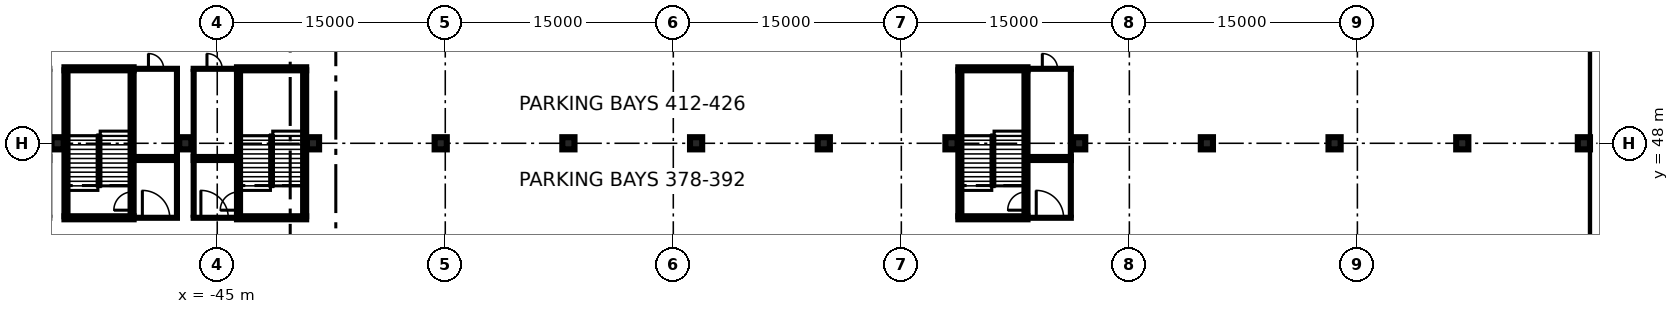
"""IFC4 building model, lengths in metres.
Left out: names, types, materials, properties, quantities, classifications, styles, units other than length and angle.
Written with IfcOpenShell. Run it as: python <this file> out.ifc"""

import sys

from ifc_helpers import new_model, si_unit, direction, frame, frame_2d, origin, origin_2d, place, context, subcontext, project, spatial, rectangle, extrude, element, fill, save


model = new_model("IFC4")
c1 = context("Model", 3, precision=1e-05, world=origin(), true_north=direction((0.0, 1.0)))
c2 = subcontext(c1, "Body", "Model", "MODEL_VIEW")
j1 = project(units=[si_unit("LENGTHUNIT", "METRE"), si_unit("PLANEANGLEUNIT", "RADIAN")], contexts=[c1])
p1 = place(None, origin())
s1 = spatial("IfcSite", under=j1, at=p1, CompositionType="ELEMENT")
p2 = place(p1, origin())
s2 = spatial("IfcBuilding", under=s1, at=p2, CompositionType="ELEMENT")
p3 = place(p2, frame((0.0, 0.0, -12.0)))
s3 = spatial("IfcBuildingStorey", under=s2, at=p3, CompositionType="ELEMENT", Elevation=-12.0)
p4 = place(p3, frame((45.75, -80.0, 0.0), z_axis=(0.0, 0.0, 1.0), x_axis=(0.0, 1.0, 0.0)))
e1 = element("IfcWall", 1, at=p4, inside=s3, PredefinedType="USERDEFINED", context=c2, shape_type="SweptSolid", body=[
    extrude(rectangle(XDim=160.0, YDim=0.9, at=frame_2d((80.0, 0.0))), origin(), (0.0, 0.0, 1.0), 11.55),
])
p5 = place(p2, frame((0.0, 0.0, -3.6)))
s4 = spatial("IfcBuildingStorey", under=s2, at=p5, CompositionType="ELEMENT", Elevation=-3.6)
for number, where, z_axis, x_axis in (
    (2, (-55.5, 48.0, -0.4), (0.0, 0.0, 1.0), (1.0, 0.0, 0.0)),
    (3, (-47.1, 48.0, -0.4), (0.0, 0.0, 1.0), (1.0, 0.0, 0.0)),
    (4, (-38.7, 48.0, -0.4), (0.0, 0.0, 1.0), (1.0, 0.0, 0.0)),
    (5, (-30.3, 48.0, -0.4), (0.0, 0.0, 1.0), (1.0, 0.0, 0.0)),
    (6, (-21.9, 48.0, -0.4), (0.0, 0.0, 1.0), (1.0, 0.0, 0.0)),
    (7, (-13.5, 48.0, -0.4), (0.0, 0.0, 1.0), (1.0, 0.0, 0.0)),
    (8, (-5.1, 48.0, -0.4), (0.0, 0.0, 1.0), (1.0, 0.0, 0.0)),
    (9, (3.3, 48.0, -0.4), (0.0, 0.0, 1.0), (1.0, 0.0, 0.0)),
    (10, (11.7, 48.0, -0.4), (0.0, 0.0, 1.0), (1.0, 0.0, 0.0)),
    (11, (20.1, 48.0, -0.4), (0.0, 0.0, 1.0), (1.0, 0.0, 0.0)),
    (12, (28.5, 48.0, -0.4), (0.0, 0.0, 1.0), (1.0, 0.0, 0.0)),
    (13, (36.9, 48.0, -0.4), (0.0, 0.0, 1.0), (1.0, 0.0, 0.0)),
    (14, (44.9, 48.0, -0.4), (0.0, 0.0, 1.0), (1.0, 0.0, 0.0)),
):
    element("IfcColumn", number, at=place(p5, frame(where, z_axis=z_axis, x_axis=x_axis)), inside=s4, PredefinedType="COLUMN", context=c2, shape_type="SweptSolid", body=[
        extrude(rectangle(XDim=0.8, YDim=0.8, at=origin_2d()), origin(), (0.0, 0.0, 1.0), 3.55),
    ])
p6 = place(p5, frame((-50.5, 43.1, 0.0), z_axis=(0.0, 0.0, 1.0), x_axis=(1.0, 0.0, 0.0)))
e15 = element("IfcWall", 15, at=p6, inside=s4, PredefinedType="PARTITIONING", context=c2, shape_type="SweptSolid", body=[
    extrude(rectangle(XDim=2.95, YDim=0.2, at=frame_2d((1.475, 0.0))), origin(), (0.0, 0.0, 1.0), 3.15),
])
p7 = place(p6, frame((0.575, 0.0, 0.0)))
e16 = element("IfcOpeningElement", 16, at=p7, cuts=e15, PredefinedType="OPENING", context=c2, shape_type="SweptSolid", body=[
    extrude(rectangle(XDim=1.8, YDim=2.1, at=frame_2d((0.9, 1.05))), frame((0.0, 0.11, 0.0), z_axis=(0.0, -1.0, 0.0), x_axis=(1.0, 0.0, 0.0)), (0.0, 0.0, 1.0), 0.22),
])
p8 = place(p5, frame((-50.5, 46.9, 0.0), z_axis=(0.0, 0.0, 1.0), x_axis=(1.0, 0.0, 0.0)))
e17 = element("IfcWall", 17, at=p8, inside=s4, PredefinedType="PARTITIONING", context=c2, shape_type="SweptSolid", body=[
    extrude(rectangle(XDim=2.95, YDim=0.2, at=frame_2d((1.475, 0.0))), origin(), (0.0, 0.0, 1.0), 3.15),
])
p9 = place(p5, frame((-47.65, 43.2, 0.0), z_axis=(0.0, 0.0, 1.0), x_axis=(0.0, 1.0, 0.0)))
e18 = element("IfcWall", 18, at=p9, inside=s4, PredefinedType="PARTITIONING", context=c2, shape_type="SweptSolid", body=[
    extrude(rectangle(XDim=3.6, YDim=0.2, at=frame_2d((1.8, 0.0))), origin(), (0.0, 0.0, 1.0), 3.15),
])
p10 = place(p5, frame((-50.5, 47.1, 0.0), z_axis=(0.0, 0.0, 1.0), x_axis=(1.0, 0.0, 0.0)))
e19 = element("IfcWall", 19, at=p10, inside=s4, PredefinedType="PARTITIONING", context=c2, shape_type="SweptSolid", body=[
    extrude(rectangle(XDim=2.95, YDim=0.2, at=frame_2d((1.475, 0.0))), origin(), (0.0, 0.0, 1.0), 3.15),
])
p11 = place(p5, frame((-50.5, 52.9, 0.0), z_axis=(0.0, 0.0, 1.0), x_axis=(1.0, 0.0, 0.0)))
e20 = element("IfcWall", 20, at=p11, inside=s4, PredefinedType="PARTITIONING", context=c2, shape_type="SweptSolid", body=[
    extrude(rectangle(XDim=2.95, YDim=0.2, at=frame_2d((1.475, 0.0))), origin(), (0.0, 0.0, 1.0), 3.15),
])
p12 = place(p11, frame((0.975, 0.0, 0.0)))
e21 = element("IfcOpeningElement", 21, at=p12, cuts=e20, PredefinedType="OPENING", context=c2, shape_type="SweptSolid", body=[
    extrude(rectangle(XDim=1.0, YDim=2.1, at=frame_2d((0.5, 1.05))), frame((0.0, 0.11, 0.0), z_axis=(0.0, -1.0, 0.0), x_axis=(1.0, 0.0, 0.0)), (0.0, 0.0, 1.0), 0.22),
])
p13 = place(p5, frame((-47.65, 47.2, 0.0), z_axis=(0.0, 0.0, 1.0), x_axis=(0.0, 1.0, 0.0)))
e22 = element("IfcWall", 22, at=p13, inside=s4, PredefinedType="PARTITIONING", context=c2, shape_type="SweptSolid", body=[
    extrude(rectangle(XDim=5.6, YDim=0.2, at=frame_2d((2.8, 0.0))), origin(), (0.0, 0.0, 1.0), 3.15),
])
p14 = place(p5, frame((8.3, 43.1, 0.0), z_axis=(0.0, 0.0, 1.0), x_axis=(1.0, 0.0, 0.0)))
e23 = element("IfcWall", 23, at=p14, inside=s4, PredefinedType="PARTITIONING", context=c2, shape_type="SweptSolid", body=[
    extrude(rectangle(XDim=2.95, YDim=0.2, at=frame_2d((1.475, 0.0))), origin(), (0.0, 0.0, 1.0), 3.15),
])
p15 = place(p14, frame((0.575, 0.0, 0.0)))
e24 = element("IfcOpeningElement", 24, at=p15, cuts=e23, PredefinedType="OPENING", context=c2, shape_type="SweptSolid", body=[
    extrude(rectangle(XDim=1.8, YDim=2.1, at=frame_2d((0.9, 1.05))), frame((0.0, 0.11, 0.0), z_axis=(0.0, -1.0, 0.0), x_axis=(1.0, 0.0, 0.0)), (0.0, 0.0, 1.0), 0.22),
])
p16 = place(p5, frame((8.3, 46.9, 0.0), z_axis=(0.0, 0.0, 1.0), x_axis=(1.0, 0.0, 0.0)))
e25 = element("IfcWall", 25, at=p16, inside=s4, PredefinedType="PARTITIONING", context=c2, shape_type="SweptSolid", body=[
    extrude(rectangle(XDim=2.95, YDim=0.2, at=frame_2d((1.475, 0.0))), origin(), (0.0, 0.0, 1.0), 3.15),
])
p17 = place(p5, frame((11.15, 43.2, 0.0), z_axis=(0.0, 0.0, 1.0), x_axis=(0.0, 1.0, 0.0)))
e26 = element("IfcWall", 26, at=p17, inside=s4, PredefinedType="PARTITIONING", context=c2, shape_type="SweptSolid", body=[
    extrude(rectangle(XDim=3.6, YDim=0.2, at=frame_2d((1.8, 0.0))), origin(), (0.0, 0.0, 1.0), 3.15),
])
p18 = place(p5, frame((8.3, 47.1, 0.0), z_axis=(0.0, 0.0, 1.0), x_axis=(1.0, 0.0, 0.0)))
e27 = element("IfcWall", 27, at=p18, inside=s4, PredefinedType="PARTITIONING", context=c2, shape_type="SweptSolid", body=[
    extrude(rectangle(XDim=2.95, YDim=0.2, at=frame_2d((1.475, 0.0))), origin(), (0.0, 0.0, 1.0), 3.15),
])
p19 = place(p5, frame((8.3, 52.9, 0.0), z_axis=(0.0, 0.0, 1.0), x_axis=(1.0, 0.0, 0.0)))
e28 = element("IfcWall", 28, at=p19, inside=s4, PredefinedType="PARTITIONING", context=c2, shape_type="SweptSolid", body=[
    extrude(rectangle(XDim=2.95, YDim=0.2, at=frame_2d((1.475, 0.0))), origin(), (0.0, 0.0, 1.0), 3.15),
])
p20 = place(p19, frame((0.975, 0.0, 0.0)))
e29 = element("IfcOpeningElement", 29, at=p20, cuts=e28, PredefinedType="OPENING", context=c2, shape_type="SweptSolid", body=[
    extrude(rectangle(XDim=1.0, YDim=2.1, at=frame_2d((0.5, 1.05))), frame((0.0, 0.11, 0.0), z_axis=(0.0, -1.0, 0.0), x_axis=(1.0, 0.0, 0.0)), (0.0, 0.0, 1.0), 0.22),
])
p21 = place(p5, frame((11.15, 47.2, 0.0), z_axis=(0.0, 0.0, 1.0), x_axis=(0.0, 1.0, 0.0)))
e30 = element("IfcWall", 30, at=p21, inside=s4, PredefinedType="PARTITIONING", context=c2, shape_type="SweptSolid", body=[
    extrude(rectangle(XDim=5.6, YDim=0.2, at=frame_2d((2.8, 0.0))), origin(), (0.0, 0.0, 1.0), 3.15),
])
p22 = place(p5, frame((-46.65, 43.1, 0.0), z_axis=(0.0, 0.0, 1.0), x_axis=(1.0, 0.0, 0.0)))
e31 = element("IfcWall", 31, at=p22, inside=s4, PredefinedType="PARTITIONING", context=c2, shape_type="SweptSolid", body=[
    extrude(rectangle(XDim=2.95, YDim=0.2, at=frame_2d((1.475, 0.0))), origin(), (0.0, 0.0, 1.0), 3.15),
])
p23 = place(p22, frame((0.575, 0.0, 0.0)))
e32 = element("IfcOpeningElement", 32, at=p23, cuts=e31, PredefinedType="OPENING", context=c2, shape_type="SweptSolid", body=[
    extrude(rectangle(XDim=1.8, YDim=2.1, at=frame_2d((0.9, 1.05))), frame((0.0, 0.11, 0.0), z_axis=(0.0, -1.0, 0.0), x_axis=(1.0, 0.0, 0.0)), (0.0, 0.0, 1.0), 0.22),
])
p24 = place(p5, frame((-46.65, 46.9, 0.0), z_axis=(0.0, 0.0, 1.0), x_axis=(1.0, 0.0, 0.0)))
e33 = element("IfcWall", 33, at=p24, inside=s4, PredefinedType="PARTITIONING", context=c2, shape_type="SweptSolid", body=[
    extrude(rectangle(XDim=2.95, YDim=0.2, at=frame_2d((1.475, 0.0))), origin(), (0.0, 0.0, 1.0), 3.15),
])
p25 = place(p5, frame((-46.55, 43.2, 0.0), z_axis=(0.0, 0.0, 1.0), x_axis=(0.0, 1.0, 0.0)))
e34 = element("IfcWall", 34, at=p25, inside=s4, PredefinedType="PARTITIONING", context=c2, shape_type="SweptSolid", body=[
    extrude(rectangle(XDim=3.6, YDim=0.2, at=frame_2d((1.8, 0.0))), origin(), (0.0, 0.0, 1.0), 3.15),
])
p26 = place(p5, frame((-46.65, 47.1, 0.0), z_axis=(0.0, 0.0, 1.0), x_axis=(1.0, 0.0, 0.0)))
e35 = element("IfcWall", 35, at=p26, inside=s4, PredefinedType="PARTITIONING", context=c2, shape_type="SweptSolid", body=[
    extrude(rectangle(XDim=2.95, YDim=0.2, at=frame_2d((1.475, 0.0))), origin(), (0.0, 0.0, 1.0), 3.15),
])
p27 = place(p5, frame((-46.65, 52.9, 0.0), z_axis=(0.0, 0.0, 1.0), x_axis=(1.0, 0.0, 0.0)))
e36 = element("IfcWall", 36, at=p27, inside=s4, PredefinedType="PARTITIONING", context=c2, shape_type="SweptSolid", body=[
    extrude(rectangle(XDim=2.95, YDim=0.2, at=frame_2d((1.475, 0.0))), origin(), (0.0, 0.0, 1.0), 3.15),
])
p28 = place(p27, frame((0.975, 0.0, 0.0)))
e37 = element("IfcOpeningElement", 37, at=p28, cuts=e36, PredefinedType="OPENING", context=c2, shape_type="SweptSolid", body=[
    extrude(rectangle(XDim=1.0, YDim=2.1, at=frame_2d((0.5, 1.05))), frame((0.0, 0.11, 0.0), z_axis=(0.0, -1.0, 0.0), x_axis=(1.0, 0.0, 0.0)), (0.0, 0.0, 1.0), 0.22),
])
p29 = place(p5, frame((-46.55, 47.2, 0.0), z_axis=(0.0, 0.0, 1.0), x_axis=(0.0, 1.0, 0.0)))
e38 = element("IfcWall", 38, at=p29, inside=s4, PredefinedType="PARTITIONING", context=c2, shape_type="SweptSolid", body=[
    extrude(rectangle(XDim=5.6, YDim=0.2, at=frame_2d((2.8, 0.0))), origin(), (0.0, 0.0, 1.0), 3.15),
])
p30 = place(p5, frame((-54.95, 43.2, 0.0), z_axis=(0.0, 0.0, 1.0), x_axis=(0.0, 1.0, 0.0)))
e39 = element("IfcWall", 39, at=p30, inside=s4, PredefinedType="SOLIDWALL", context=c2, shape_type="SweptSolid", body=[
    extrude(rectangle(XDim=9.6, YDim=0.2, at=frame_2d((4.8, 0.0))), origin(), (0.0, 0.0, 1.0), 3.15),
])
p31 = place(p5, frame((-50.6, 43.2, 0.0), z_axis=(0.0, 0.0, 1.0), x_axis=(0.0, 1.0, 0.0)))
e40 = element("IfcWall", 40, at=p31, inside=s4, PredefinedType="SOLIDWALL", context=c2, shape_type="SweptSolid", body=[
    extrude(rectangle(XDim=9.6, YDim=0.2, at=frame_2d((4.8, 0.0))), origin(), (0.0, 0.0, 1.0), 3.15),
])
p32 = place(p31, frame((0.4, 0.0, 0.0)))
e41 = element("IfcOpeningElement", 41, at=p32, cuts=e40, PredefinedType="OPENING", context=c2, shape_type="SweptSolid", body=[
    extrude(rectangle(XDim=1.2, YDim=2.1, at=frame_2d((0.6, 1.05))), frame((0.0, 0.11, 0.0), z_axis=(0.0, -1.0, 0.0), x_axis=(1.0, 0.0, 0.0)), (0.0, 0.0, 1.0), 0.22),
])
for number, where, z_axis, x_axis in (
    (42, (-50.5, 43.1, 0.0), (0.0, 0.0, 1.0), (-1.0, 0.0, 0.0)),
    (43, (-55.05, 52.9, 0.0), (0.0, 0.0, 1.0), (1.0, 0.0, 0.0)),
):
    element("IfcWall", number, at=place(p5, frame(where, z_axis=z_axis, x_axis=x_axis)), inside=s4, PredefinedType="SOLIDWALL", context=c2, shape_type="SweptSolid", body=[
        extrude(rectangle(XDim=4.55, YDim=0.2, at=frame_2d((2.275, 0.0))), origin(), (0.0, 0.0, 1.0), 3.15),
    ])
p33 = place(p5, frame((3.85, 43.2, 0.0), z_axis=(0.0, 0.0, 1.0), x_axis=(0.0, 1.0, 0.0)))
e44 = element("IfcWall", 44, at=p33, inside=s4, PredefinedType="SOLIDWALL", context=c2, shape_type="SweptSolid", body=[
    extrude(rectangle(XDim=9.6, YDim=0.2, at=frame_2d((4.8, 0.0))), origin(), (0.0, 0.0, 1.0), 3.15),
])
p34 = place(p5, frame((8.2, 43.2, 0.0), z_axis=(0.0, 0.0, 1.0), x_axis=(0.0, 1.0, 0.0)))
e45 = element("IfcWall", 45, at=p34, inside=s4, PredefinedType="SOLIDWALL", context=c2, shape_type="SweptSolid", body=[
    extrude(rectangle(XDim=9.6, YDim=0.2, at=frame_2d((4.8, 0.0))), origin(), (0.0, 0.0, 1.0), 3.15),
])
p35 = place(p34, frame((0.4, 0.0, 0.0)))
e46 = element("IfcOpeningElement", 46, at=p35, cuts=e45, PredefinedType="OPENING", context=c2, shape_type="SweptSolid", body=[
    extrude(rectangle(XDim=1.2, YDim=2.1, at=frame_2d((0.6, 1.05))), frame((0.0, 0.11, 0.0), z_axis=(0.0, -1.0, 0.0), x_axis=(1.0, 0.0, 0.0)), (0.0, 0.0, 1.0), 0.22),
])
for number, where, z_axis, x_axis in (
    (47, (8.3, 43.1, 0.0), (0.0, 0.0, 1.0), (-1.0, 0.0, 0.0)),
    (48, (3.75, 52.9, 0.0), (0.0, 0.0, 1.0), (1.0, 0.0, 0.0)),
):
    element("IfcWall", number, at=place(p5, frame(where, z_axis=z_axis, x_axis=x_axis)), inside=s4, PredefinedType="SOLIDWALL", context=c2, shape_type="SweptSolid", body=[
        extrude(rectangle(XDim=4.55, YDim=0.2, at=frame_2d((2.275, 0.0))), origin(), (0.0, 0.0, 1.0), 3.15),
    ])
p36 = place(p5, frame((-43.6, 43.2, 0.0), z_axis=(0.0, 0.0, 1.0), x_axis=(0.0, 1.0, 0.0)))
e49 = element("IfcWall", 49, at=p36, inside=s4, PredefinedType="SOLIDWALL", context=c2, shape_type="SweptSolid", body=[
    extrude(rectangle(XDim=9.6, YDim=0.2, at=frame_2d((4.8, 0.0))), origin(), (0.0, 0.0, 1.0), 3.15),
])
p37 = place(p36, frame((0.4, 0.0, 0.0)))
e50 = element("IfcOpeningElement", 50, at=p37, cuts=e49, PredefinedType="OPENING", context=c2, shape_type="SweptSolid", body=[
    extrude(rectangle(XDim=1.2, YDim=2.1, at=frame_2d((0.6, 1.05))), frame((0.0, 0.11, 0.0), z_axis=(0.0, -1.0, 0.0), x_axis=(1.0, 0.0, 0.0)), (0.0, 0.0, 1.0), 0.22),
])
p38 = place(p5, frame((-39.25, 43.2, 0.0), z_axis=(0.0, 0.0, 1.0), x_axis=(0.0, 1.0, 0.0)))
e51 = element("IfcWall", 51, at=p38, inside=s4, PredefinedType="SOLIDWALL", context=c2, shape_type="SweptSolid", body=[
    extrude(rectangle(XDim=9.6, YDim=0.2, at=frame_2d((4.8, 0.0))), origin(), (0.0, 0.0, 1.0), 3.15),
])
for number, where, z_axis, x_axis in (
    (52, (-39.15, 43.1, 0.0), (0.0, 0.0, 1.0), (-1.0, 0.0, 0.0)),
    (53, (-43.7, 52.9, 0.0), (0.0, 0.0, 1.0), (1.0, 0.0, 0.0)),
):
    element("IfcWall", number, at=place(p5, frame(where, z_axis=z_axis, x_axis=x_axis)), inside=s4, PredefinedType="SOLIDWALL", context=c2, shape_type="SweptSolid", body=[
        extrude(rectangle(XDim=4.55, YDim=0.2, at=frame_2d((2.275, 0.0))), origin(), (0.0, 0.0, 1.0), 3.15),
    ])
p39 = place(p7, origin())
e54 = element("IfcDoor", 54, at=p39, inside=s4, OperationType="DOUBLE_DOOR_SINGLE_SWING", PredefinedType="DOOR", context=c2, shape_type="SweptSolid", body=[
    extrude(rectangle(XDim=1.8, YDim=2.1, at=frame_2d((0.9, 1.05))), frame((0.0, 0.025, 0.0), z_axis=(0.0, -1.0, 0.0), x_axis=(1.0, 0.0, 0.0)), (0.0, 0.0, 1.0), 0.05),
])
fill(e16, e54)
p40 = place(p12, origin())
e55 = element("IfcDoor", 55, at=p40, inside=s4, OperationType="SINGLE_SWING_LEFT", PredefinedType="DOOR", context=c2, shape_type="SweptSolid", body=[
    extrude(rectangle(XDim=1.0, YDim=2.1, at=frame_2d((0.5, 1.05))), frame((0.0, 0.025, 0.0), z_axis=(0.0, -1.0, 0.0), x_axis=(1.0, 0.0, 0.0)), (0.0, 0.0, 1.0), 0.05),
])
fill(e21, e55)
p41 = place(p15, origin())
e56 = element("IfcDoor", 56, at=p41, inside=s4, OperationType="DOUBLE_DOOR_SINGLE_SWING", PredefinedType="DOOR", context=c2, shape_type="SweptSolid", body=[
    extrude(rectangle(XDim=1.8, YDim=2.1, at=frame_2d((0.9, 1.05))), frame((0.0, 0.025, 0.0), z_axis=(0.0, -1.0, 0.0), x_axis=(1.0, 0.0, 0.0)), (0.0, 0.0, 1.0), 0.05),
])
fill(e24, e56)
p42 = place(p20, origin())
e57 = element("IfcDoor", 57, at=p42, inside=s4, OperationType="SINGLE_SWING_LEFT", PredefinedType="DOOR", context=c2, shape_type="SweptSolid", body=[
    extrude(rectangle(XDim=1.0, YDim=2.1, at=frame_2d((0.5, 1.05))), frame((0.0, 0.025, 0.0), z_axis=(0.0, -1.0, 0.0), x_axis=(1.0, 0.0, 0.0)), (0.0, 0.0, 1.0), 0.05),
])
fill(e29, e57)
p43 = place(p23, origin())
e58 = element("IfcDoor", 58, at=p43, inside=s4, OperationType="DOUBLE_DOOR_SINGLE_SWING", PredefinedType="DOOR", context=c2, shape_type="SweptSolid", body=[
    extrude(rectangle(XDim=1.8, YDim=2.1, at=frame_2d((0.9, 1.05))), frame((0.0, 0.025, 0.0), z_axis=(0.0, -1.0, 0.0), x_axis=(1.0, 0.0, 0.0)), (0.0, 0.0, 1.0), 0.05),
])
fill(e32, e58)
p44 = place(p28, origin())
e59 = element("IfcDoor", 59, at=p44, inside=s4, OperationType="SINGLE_SWING_LEFT", PredefinedType="DOOR", context=c2, shape_type="SweptSolid", body=[
    extrude(rectangle(XDim=1.0, YDim=2.1, at=frame_2d((0.5, 1.05))), frame((0.0, 0.025, 0.0), z_axis=(0.0, -1.0, 0.0), x_axis=(1.0, 0.0, 0.0)), (0.0, 0.0, 1.0), 0.05),
])
fill(e37, e59)
p45 = place(p32, origin())
e60 = element("IfcDoor", 60, at=p45, inside=s4, OperationType="SINGLE_SWING_LEFT", PredefinedType="DOOR", context=c2, shape_type="SweptSolid", body=[
    extrude(rectangle(XDim=1.2, YDim=2.1, at=frame_2d((0.6, 1.05))), frame((0.0, 0.025, 0.0), z_axis=(0.0, -1.0, 0.0), x_axis=(1.0, 0.0, 0.0)), (0.0, 0.0, 1.0), 0.05),
])
fill(e41, e60)
p46 = place(p35, origin())
e61 = element("IfcDoor", 61, at=p46, inside=s4, OperationType="SINGLE_SWING_LEFT", PredefinedType="DOOR", context=c2, shape_type="SweptSolid", body=[
    extrude(rectangle(XDim=1.2, YDim=2.1, at=frame_2d((0.6, 1.05))), frame((0.0, 0.025, 0.0), z_axis=(0.0, -1.0, 0.0), x_axis=(1.0, 0.0, 0.0)), (0.0, 0.0, 1.0), 0.05),
])
fill(e46, e61)
p47 = place(p37, origin())
e62 = element("IfcDoor", 62, at=p47, inside=s4, OperationType="SINGLE_SWING_LEFT", PredefinedType="DOOR", context=c2, shape_type="SweptSolid", body=[
    extrude(rectangle(XDim=1.2, YDim=2.1, at=frame_2d((0.6, 1.05))), frame((0.0, 0.025, 0.0), z_axis=(0.0, -1.0, 0.0), x_axis=(1.0, 0.0, 0.0)), (0.0, 0.0, 1.0), 0.05),
])
fill(e50, e62)
save(model, sys.argv[1])
